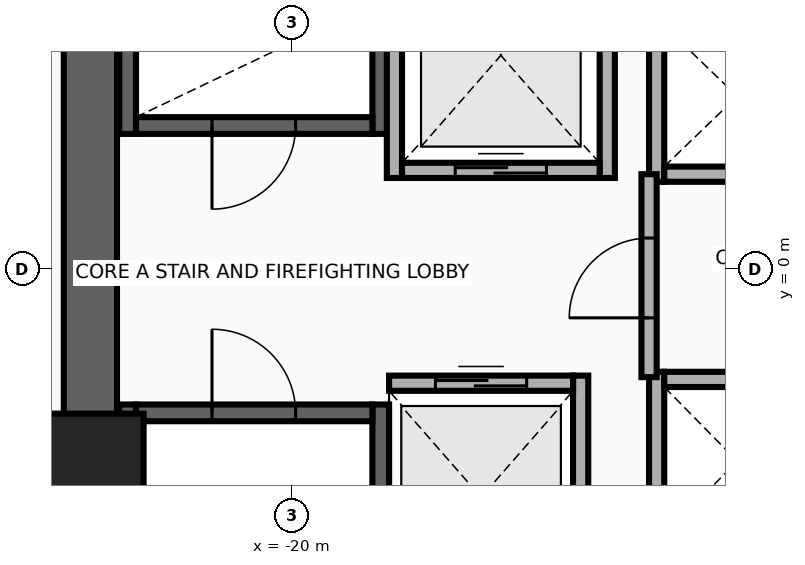
"""IFC4 building model, lengths in metres.
Left out: names, types, materials, properties, quantities, classifications, styles, units other than length and angle.
Written with IfcOpenShell. Run it as: python <this file> out.ifc"""

import sys

from ifc_helpers import new_model, si_unit, direction, frame, frame_2d, origin, origin_2d, place, context, subcontext, project, spatial, rectangle, extrude, source, transform, mapped, element, fill, save


model = new_model("IFC4")
c1 = context("Model", 3, precision=1e-05, world=origin(), true_north=direction((0.0, 1.0)))
c2 = subcontext(c1, "Body", "Model", "MODEL_VIEW")
j1 = project(units=[si_unit("LENGTHUNIT", "METRE"), si_unit("PLANEANGLEUNIT", "RADIAN")], contexts=[c1])
p1 = place(None, origin())
s1 = spatial("IfcSite", under=j1, at=p1, CompositionType="ELEMENT")
p2 = place(p1, origin())
s2 = spatial("IfcBuilding", under=s1, at=p2, CompositionType="ELEMENT")
p3 = place(p2, frame((0.0, 0.0, 29.7)))
s3 = spatial("IfcBuildingStorey", under=s2, at=p3, CompositionType="ELEMENT", Elevation=29.7)
for number, where, z_axis, x_axis in (
    (1, (-22.16, 1.78, 0.0), (0.0, 0.0, 1.0), (0.0, 1.0, 0.0)),
    (2, (-18.83, 1.78, 0.0), (0.0, 0.0, 1.0), (0.0, 1.0, 0.0)),
):
    element("IfcWall", number, at=place(p3, frame(where, z_axis=z_axis, x_axis=x_axis)), inside=s3, PredefinedType="SHEAR", context=c2, shape_type="SweptSolid", body=[
        extrude(rectangle(XDim=8.67, YDim=0.22, at=frame_2d((4.335, 0.0))), origin(), (0.0, 0.0, 1.0), 3.46),
    ])
p4 = place(p3, frame((-22.05, 1.89, 0.0), z_axis=(0.0, 0.0, 1.0), x_axis=(1.0, 0.0, 0.0)))
e3 = element("IfcWall", 3, at=p4, inside=s3, PredefinedType="SHEAR", context=c2, shape_type="SweptSolid", body=[
    extrude(rectangle(XDim=3.11, YDim=0.22, at=frame_2d((1.555, 0.0))), origin(), (0.0, 0.0, 1.0), 3.46),
])
p5 = place(p4, frame((1.0, 0.0, 0.0)))
e4 = element("IfcOpeningElement", 4, at=p5, cuts=e3, PredefinedType="OPENING", context=c2, shape_type="SweptSolid", body=[
    extrude(rectangle(XDim=1.1, YDim=2.15, at=frame_2d((0.55, 1.075))), frame((0.0, 0.125, 0.0), z_axis=(0.0, -1.0, 0.0), x_axis=(1.0, 0.0, 0.0)), (0.0, 0.0, 1.0), 0.25),
])
for number, where, z_axis, x_axis in (
    (5, (-22.16, -10.45, 0.0), (0.0, 0.0, 1.0), (0.0, 1.0, 0.0)),
    (6, (-18.83, -10.45, 0.0), (0.0, 0.0, 1.0), (0.0, 1.0, 0.0)),
):
    element("IfcWall", number, at=place(p3, frame(where, z_axis=z_axis, x_axis=x_axis)), inside=s3, PredefinedType="SHEAR", context=c2, shape_type="SweptSolid", body=[
        extrude(rectangle(XDim=8.67, YDim=0.22, at=frame_2d((4.335, 0.0))), origin(), (0.0, 0.0, 1.0), 3.46),
    ])
p6 = place(p3, frame((-22.05, -1.89, 0.0), z_axis=(0.0, 0.0, 1.0), x_axis=(1.0, 0.0, 0.0)))
e7 = element("IfcWall", 7, at=p6, inside=s3, PredefinedType="SHEAR", context=c2, shape_type="SweptSolid", body=[
    extrude(rectangle(XDim=3.11, YDim=0.22, at=frame_2d((1.555, 0.0))), origin(), (0.0, 0.0, 1.0), 3.46),
])
p7 = place(p6, frame((1.0, 0.0, 0.0)))
e8 = element("IfcOpeningElement", 8, at=p7, cuts=e7, PredefinedType="OPENING", context=c2, shape_type="SweptSolid", body=[
    extrude(rectangle(XDim=1.1, YDim=2.15, at=frame_2d((0.55, 1.075))), frame((0.0, 0.125, 0.0), z_axis=(0.0, -1.0, 0.0), x_axis=(1.0, 0.0, 0.0)), (0.0, 0.0, 1.0), 0.25),
])
p8 = place(p3, frame((-22.65, -11.15, 0.0), z_axis=(0.0, 0.0, 1.0), x_axis=(0.0, 1.0, 0.0)))
e9 = element("IfcWall", 9, at=p8, inside=s3, PredefinedType="SHEAR", context=c2, shape_type="SweptSolid", body=[
    extrude(rectangle(XDim=22.3, YDim=0.7, at=frame_2d((11.15, 0.0))), origin(), (0.0, 0.0, 1.0), 3.46),
])
m1 = source(origin(), c2, "Body", "SweptSolid", [
    extrude(rectangle(XDim=1.4, YDim=1.4, at=origin_2d()), origin(), (0.0, 0.0, 1.0), 3.7),
])
p9 = place(p3, frame((-22.65, -2.6, 0.0), z_axis=(0.0, 0.0, 1.0), x_axis=(1.0, 0.0, 0.0)))
e10 = element("IfcColumn", 10, at=p9, inside=s3, PredefinedType="COLUMN", context=c2, shape_type="MappedRepresentation", body=[
    mapped(m1, transform((0.0, 0.0, 0.0), x_axis=(1.0, 0.0, 0.0), y_axis=(0.0, 1.0, 0.0), z_axis=(0.0, 0.0, 1.0), scale=1.0)),
])
for number, where, z_axis, x_axis in (
    (11, (-18.65, 1.2, 0.0), (0.0, 0.0, 1.0), (0.0, 1.0, 0.0)),
    (12, (-15.85, 1.2, 0.0), (0.0, 0.0, 1.0), (0.0, 1.0, 0.0)),
):
    element("IfcWall", number, at=place(p3, frame(where, z_axis=z_axis, x_axis=x_axis)), inside=s3, PredefinedType="MOVABLE", context=c2, shape_type="SweptSolid", body=[
        extrude(rectangle(XDim=3.225, YDim=0.2, at=frame_2d((1.613, 0.0))), origin(), (0.0, 0.0, 1.0), 3.46),
    ])
p10 = place(p3, frame((-18.55, 1.3, 0.0), z_axis=(0.0, 0.0, 1.0), x_axis=(1.0, 0.0, 0.0)))
e13 = element("IfcWall", 13, at=p10, inside=s3, PredefinedType="MOVABLE", context=c2, shape_type="SweptSolid", body=[
    extrude(rectangle(XDim=2.6, YDim=0.2, at=frame_2d((1.3, 0.0))), origin(), (0.0, 0.0, 1.0), 3.46),
])
p11 = place(p10, frame((0.7, 0.0, 0.0)))
e14 = element("IfcOpeningElement", 14, at=p11, cuts=e13, PredefinedType="OPENING", context=c2, shape_type="SweptSolid", body=[
    extrude(rectangle(XDim=1.2, YDim=2.1, at=frame_2d((0.6, 1.05))), frame((0.0, 0.115, 0.0), z_axis=(0.0, -1.0, 0.0), x_axis=(1.0, 0.0, 0.0)), (0.0, 0.0, 1.0), 0.23),
])
p12 = place(p3, frame((-16.2, -4.6, 0.0), z_axis=(0.0, 0.0, 1.0), x_axis=(0.0, 1.0, 0.0)))
e15 = element("IfcWall", 15, at=p12, inside=s3, PredefinedType="MOVABLE", context=c2, shape_type="SweptSolid", body=[
    extrude(rectangle(XDim=3.2, YDim=0.2, at=frame_2d((1.6, 0.0))), origin(), (0.0, 0.0, 1.0), 3.46),
])
p13 = place(p3, frame((-18.72, -1.5, 0.0), z_axis=(0.0, 0.0, 1.0), x_axis=(1.0, 0.0, 0.0)))
e16 = element("IfcWall", 16, at=p13, inside=s3, PredefinedType="MOVABLE", context=c2, shape_type="SweptSolid", body=[
    extrude(rectangle(XDim=2.42, YDim=0.2, at=frame_2d((1.21, 0.0))), origin(), (0.0, 0.0, 1.0), 3.46),
])
p14 = place(p13, frame((0.61, 0.0, 0.0)))
e17 = element("IfcOpeningElement", 17, at=p14, cuts=e16, PredefinedType="OPENING", context=c2, shape_type="SweptSolid", body=[
    extrude(rectangle(XDim=1.2, YDim=2.1, at=frame_2d((0.6, 1.05))), frame((0.0, 0.115, 0.0), z_axis=(0.0, -1.0, 0.0), x_axis=(1.0, 0.0, 0.0)), (0.0, 0.0, 1.0), 0.23),
])
p15 = place(p3, frame((-15.2, 1.15, 0.0), z_axis=(0.0, 0.0, 1.0), x_axis=(0.0, 1.0, 0.0)))
e18 = element("IfcWall", 18, at=p15, inside=s3, PredefinedType="MOVABLE", context=c2, shape_type="SweptSolid", body=[
    extrude(rectangle(XDim=2.25, YDim=0.2, at=frame_2d((1.125, 0.0))), origin(), (0.0, 0.0, 1.0), 3.46),
])
p16 = place(p3, frame((-15.1, 1.25, 0.0), z_axis=(0.0, 0.0, 1.0), x_axis=(1.0, 0.0, 0.0)))
e19 = element("IfcWall", 19, at=p16, inside=s3, PredefinedType="MOVABLE", context=c2, shape_type="SweptSolid", body=[
    extrude(rectangle(XDim=1.92, YDim=0.2, at=frame_2d((0.96, 0.0))), origin(), (0.0, 0.0, 1.0), 3.46),
])
p17 = place(p3, frame((-15.2, -3.7, 0.0), z_axis=(0.0, 0.0, 1.0), x_axis=(0.0, 1.0, 0.0)))
e20 = element("IfcWall", 20, at=p17, inside=s3, PredefinedType="MOVABLE", context=c2, shape_type="SweptSolid", body=[
    extrude(rectangle(XDim=2.35, YDim=0.2, at=frame_2d((1.175, 0.0))), origin(), (0.0, 0.0, 1.0), 3.46),
])
p18 = place(p3, frame((-15.1, -1.45, 0.0), z_axis=(0.0, 0.0, 1.0), x_axis=(1.0, 0.0, 0.0)))
e21 = element("IfcWall", 21, at=p18, inside=s3, PredefinedType="MOVABLE", context=c2, shape_type="SweptSolid", body=[
    extrude(rectangle(XDim=1.92, YDim=0.2, at=frame_2d((0.96, 0.0))), origin(), (0.0, 0.0, 1.0), 3.46),
])
p19 = place(p3, frame((-15.3, -1.42, 0.0), z_axis=(0.0, 0.0, 1.0), x_axis=(0.0, 1.0, 0.0)))
e22 = element("IfcWall", 22, at=p19, inside=s3, PredefinedType="PARTITIONING", context=c2, shape_type="SweptSolid", body=[
    extrude(rectangle(XDim=2.67, YDim=0.2, at=frame_2d((1.335, 0.0))), origin(), (0.0, 0.0, 1.0), 3.46),
])
p20 = place(p19, frame((0.78, 0.0, 0.0)))
e23 = element("IfcOpeningElement", 23, at=p20, cuts=e22, PredefinedType="OPENING", context=c2, shape_type="SweptSolid", body=[
    extrude(rectangle(XDim=1.05, YDim=2.15, at=frame_2d((0.525, 1.075))), frame((0.0, 0.115, 0.0), z_axis=(0.0, -1.0, 0.0), x_axis=(1.0, 0.0, 0.0)), (0.0, 0.0, 1.0), 0.23),
])
p21 = place(p11, origin())
e24 = element("IfcDoor", 24, at=p21, inside=s3, OperationType="DOUBLE_DOOR_SLIDING", PredefinedType="DOOR", context=c2, shape_type="SweptSolid", body=[
    extrude(rectangle(XDim=1.2, YDim=2.1, at=frame_2d((0.6, 1.05))), frame((0.0, 0.025, 0.0), z_axis=(0.0, -1.0, 0.0), x_axis=(1.0, 0.0, 0.0)), (0.0, 0.0, 1.0), 0.05),
])
fill(e14, e24)
p22 = place(p14, origin())
e25 = element("IfcDoor", 25, at=p22, inside=s3, OperationType="DOUBLE_DOOR_SLIDING", PredefinedType="DOOR", context=c2, shape_type="SweptSolid", body=[
    extrude(rectangle(XDim=1.2, YDim=2.1, at=frame_2d((0.6, 1.05))), frame((0.0, 0.025, 0.0), z_axis=(0.0, -1.0, 0.0), x_axis=(1.0, 0.0, 0.0)), (0.0, 0.0, 1.0), 0.05),
])
fill(e17, e25)
p23 = place(p20, origin())
e26 = element("IfcDoor", 26, at=p23, inside=s3, OperationType="SINGLE_SWING_RIGHT", PredefinedType="DOOR", context=c2, shape_type="SweptSolid", body=[
    extrude(rectangle(XDim=1.05, YDim=2.15, at=frame_2d((0.525, 1.075))), frame((0.0, 0.025, 0.0), z_axis=(0.0, -1.0, 0.0), x_axis=(1.0, 0.0, 0.0)), (0.0, 0.0, 1.0), 0.05),
])
fill(e23, e26)
p24 = place(p5, frame((1.1, 0.0, 0.0), z_axis=(0.0, 0.0, 1.0), x_axis=(-1.0, 0.0, 0.0)))
e27 = element("IfcDoor", 27, at=p24, inside=s3, OperationType="SINGLE_SWING_LEFT", PredefinedType="DOOR", context=c2, shape_type="SweptSolid", body=[
    extrude(rectangle(XDim=1.1, YDim=2.15, at=frame_2d((0.55, 1.075))), frame((0.0, 0.025, 0.0), z_axis=(0.0, -1.0, 0.0), x_axis=(1.0, 0.0, 0.0)), (0.0, 0.0, 1.0), 0.05),
])
fill(e4, e27)
p25 = place(p7, origin())
e28 = element("IfcDoor", 28, at=p25, inside=s3, OperationType="SINGLE_SWING_RIGHT", PredefinedType="DOOR", context=c2, shape_type="SweptSolid", body=[
    extrude(rectangle(XDim=1.1, YDim=2.15, at=frame_2d((0.55, 1.075))), frame((0.0, 0.025, 0.0), z_axis=(0.0, -1.0, 0.0), x_axis=(1.0, 0.0, 0.0)), (0.0, 0.0, 1.0), 0.05),
])
fill(e8, e28)
save(model, sys.argv[1])
